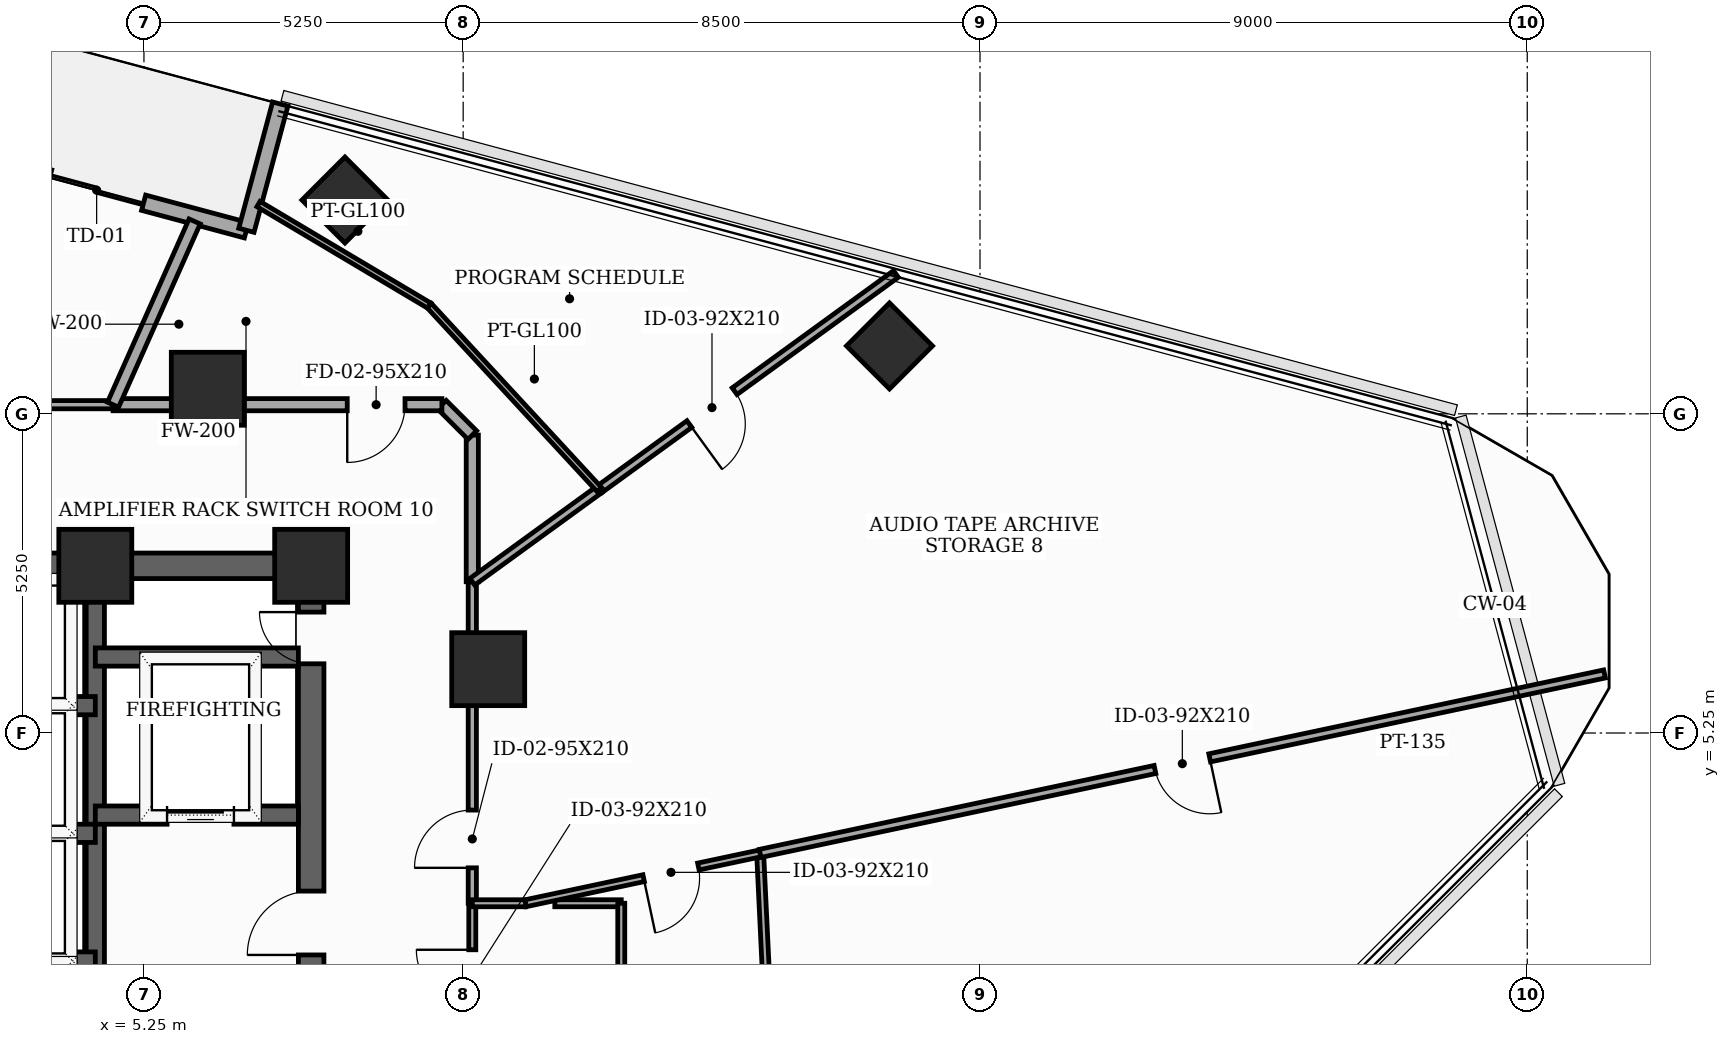
"""IFC4 building model, lengths in metres.
Left out: names, types, materials, properties, quantities, classifications, styles, units other than length and angle.
Written with IfcOpenShell. Run it as: python <this file> out.ifc"""

import sys

from ifc_helpers import new_model, si_unit, direction, frame, frame_2d, origin, origin_2d, place, context, subcontext, project, spatial, rectangle, extrude, element, fill, save


model = new_model("IFC4")
c1 = context("Model", 3, precision=1e-05, world=origin(), true_north=direction((0.0, 1.0)))
c2 = subcontext(c1, "Body", "Model", "MODEL_VIEW")
j1 = project(units=[si_unit("LENGTHUNIT", "METRE"), si_unit("PLANEANGLEUNIT", "RADIAN")], contexts=[c1])
p1 = place(None, origin())
s1 = spatial("IfcSite", under=j1, at=p1, CompositionType="ELEMENT")
p2 = place(p1, origin())
s2 = spatial("IfcBuilding", under=s1, at=p2, CompositionType="ELEMENT")
p3 = place(p2, frame((0.0, 0.0, 191.6)))
s3 = spatial("IfcBuildingStorey", under=s2, at=p3, CompositionType="ELEMENT", Elevation=191.6)
for number, where, z_axis, x_axis in (
    (1, (8.0, 8.0, 0.0), (0.0, 0.0, 1.0), (1.0, 0.0, 0.0)),
    (2, (4.45, 8.0, 0.0), (0.0, 0.0, 1.0), (1.0, 0.0, 0.0)),
    (3, (10.912, 6.3, 0.0), (0.0, 0.0, 1.0), (1.0, 0.0, 0.0)),
    (4, (6.3, 10.912, 0.0), (0.0, 0.0, 1.0), (1.0, 0.0, 0.0)),
):
    element("IfcColumn", number, at=place(p3, frame(where, z_axis=z_axis, x_axis=x_axis)), inside=s3, PredefinedType="COLUMN", context=c2, shape_type="SweptSolid", body=[
        extrude(rectangle(XDim=1.2, YDim=1.2, at=origin_2d()), origin(), (0.0, 0.0, 1.0), 3.7),
    ])
for number, where, z_axis, x_axis in (
    (5, (17.511, 11.616, 0.0), (0.0, 0.0, 1.0), (0.707, 0.707, 0.0)),
    (6, (8.555, 14.016, 0.0), (0.0, 0.0, 1.0), (0.707, 0.707, 0.0)),
):
    element("IfcColumn", number, at=place(p3, frame(where, z_axis=z_axis, x_axis=x_axis)), inside=s3, PredefinedType="COLUMN", context=c2, shape_type="SweptSolid", body=[
        extrude(rectangle(XDim=1.0, YDim=1.0, at=origin_2d()), origin(), (0.0, 0.0, 1.0), 3.7),
    ])
p4 = place(p3, frame((6.935, 13.519, 0.0), z_axis=(0.0, 0.0, 1.0), x_axis=(-0.965922825334, 0.258830244561, 0.0)))
e7 = element("IfcWall", 7, at=p4, inside=s3, PredefinedType="SOLIDWALL", context=c2, shape_type="SweptSolid", body=[
    extrude(rectangle(XDim=10.8, YDim=0.26, at=frame_2d((5.4, 0.0))), origin(), (0.0, 0.0, 1.0), 3.5),
])
p5 = place(p4, frame((1.75, 0.0, 0.0)))
e8 = element("IfcOpeningElement", 8, at=p5, cuts=e7, PredefinedType="OPENING", context=c2, shape_type="SweptSolid", body=[
    extrude(rectangle(XDim=1.6, YDim=2.08, at=frame_2d((0.8, 1.04))), frame((0.0, 0.14, 0.0), z_axis=(0.0, -1.0, 0.0), x_axis=(1.0, 0.0, 0.0)), (0.0, 0.0, 1.0), 0.28),
])
p6 = place(p4, frame((5.65, 0.0, 0.85)))
e9 = element("IfcOpeningElement", 9, at=p6, cuts=e7, PredefinedType="OPENING", context=c2, shape_type="SweptSolid", body=[
    extrude(rectangle(XDim=1.3, YDim=1.25, at=frame_2d((0.65, 0.625))), frame((0.0, 0.14, 0.0), z_axis=(0.0, -1.0, 0.0), x_axis=(1.0, 0.0, 0.0)), (0.0, 0.0, 1.0), 0.28),
])
p7 = place(p3, frame((7.492, 15.595, 0.0), z_axis=(0.0, 0.0, 1.0), x_axis=(-0.258772030677, -0.96593842254, 0.0)))
e10 = element("IfcWall", 10, at=p7, inside=s3, PredefinedType="SOLIDWALL", context=c2, shape_type="SweptSolid", body=[
    extrude(rectangle(XDim=2.15, YDim=0.26, at=frame_2d((1.075, 0.0))), origin(), (0.0, 0.0, 1.0), 3.5),
])
p8 = place(p3, frame((8.0, -8.0, 0.0), z_axis=(0.0, 0.0, 1.0), x_axis=(0.0, 1.0, 0.0)))
e11 = element("IfcWall", 11, at=p8, inside=s3, PredefinedType="SHEAR", context=c2, shape_type="SweptSolid", body=[
    extrude(rectangle(XDim=16.0, YDim=0.42, at=frame_2d((8.0, 0.0))), origin(), (0.0, 0.0, 1.0), 3.5),
])
p9 = place(p8, frame((9.6, 0.0, 0.0)))
e12 = element("IfcOpeningElement", 12, at=p9, cuts=e11, PredefinedType="OPENING", context=c2, shape_type="SweptSolid", body=[
    extrude(rectangle(XDim=1.05, YDim=2.15, at=frame_2d((0.525, 1.075))), frame((0.0, 0.22, 0.0), z_axis=(0.0, -1.0, 0.0), x_axis=(1.0, 0.0, 0.0)), (0.0, 0.0, 1.0), 0.44),
])
p10 = place(p8, frame((14.389, 0.0, 0.0)))
e13 = element("IfcOpeningElement", 13, at=p10, cuts=e11, PredefinedType="OPENING", context=c2, shape_type="SweptSolid", body=[
    extrude(rectangle(XDim=0.85, YDim=2.02, at=frame_2d((0.425, 1.01))), frame((0.0, 0.22, 0.0), z_axis=(0.0, -1.0, 0.0), x_axis=(1.0, 0.0, 0.0)), (0.0, 0.0, 1.0), 0.44),
])
p11 = place(p3, frame((-8.0, 8.0, 0.0), z_axis=(0.0, 0.0, 1.0), x_axis=(1.0, 0.0, 0.0)))
e14 = element("IfcWall", 14, at=p11, inside=s3, PredefinedType="SHEAR", context=c2, shape_type="SweptSolid", body=[
    extrude(rectangle(XDim=16.0, YDim=0.42, at=frame_2d((8.0, 0.0))), origin(), (0.0, 0.0, 1.0), 3.5),
])
p12 = place(p11, frame((7.1, 0.0, 0.0)))
e15 = element("IfcOpeningElement", 15, at=p12, cuts=e14, PredefinedType="OPENING", context=c2, shape_type="SweptSolid", body=[
    extrude(rectangle(XDim=1.8, YDim=2.15, at=frame_2d((0.9, 1.075))), frame((0.0, 0.22, 0.0), z_axis=(0.0, -1.0, 0.0), x_axis=(1.0, 0.0, 0.0)), (0.0, 0.0, 1.0), 0.44),
])
p13 = place(p3, frame((4.45, -7.79, 0.0), z_axis=(0.0, 0.0, 1.0), x_axis=(0.0, 1.0, 0.0)))
e16 = element("IfcWall", 16, at=p13, inside=s3, PredefinedType="SHEAR", context=c2, shape_type="SweptSolid", body=[
    extrude(rectangle(XDim=15.58, YDim=0.3, at=frame_2d((7.79, 0.0))), origin(), (0.0, 0.0, 1.0), 3.5),
])
p14 = place(p3, frame((4.45, 3.9, 0.0), z_axis=(0.0, 0.0, 1.0), x_axis=(1.0, 0.0, 0.0)))
e17 = element("IfcWall", 17, at=p14, inside=s3, PredefinedType="SHEAR", context=c2, shape_type="SweptSolid", body=[
    extrude(rectangle(XDim=3.34, YDim=0.3, at=frame_2d((1.67, 0.0))), origin(), (0.0, 0.0, 1.0), 3.5),
])
p15 = place(p14, frame((1.18, 0.0, 0.0)))
e18 = element("IfcOpeningElement", 18, at=p15, cuts=e17, PredefinedType="OPENING", context=c2, shape_type="SweptSolid", body=[
    extrude(rectangle(XDim=1.1, YDim=2.1, at=frame_2d((0.55, 1.05))), frame((0.0, 0.16, 0.0), z_axis=(0.0, -1.0, 0.0), x_axis=(1.0, 0.0, 0.0)), (0.0, 0.0, 1.0), 0.32),
])
p16 = place(p3, frame((4.45, 6.5, 0.0), z_axis=(0.0, 0.0, 1.0), x_axis=(1.0, 0.0, 0.0)))
e19 = element("IfcWall", 19, at=p16, inside=s3, PredefinedType="SHEAR", context=c2, shape_type="SweptSolid", body=[
    extrude(rectangle(XDim=3.34, YDim=0.3, at=frame_2d((1.67, 0.0))), origin(), (0.0, 0.0, 1.0), 3.5),
])
for number, where, z_axis, x_axis in (
    (20, (1.68, 1.5, 0.0), (0.0, 0.0, 1.0), (1.0, 0.0, 0.0)),
    (21, (1.68, 3.6, 0.0), (0.0, 0.0, 1.0), (1.0, 0.0, 0.0)),
    (22, (1.68, 5.7, 0.0), (0.0, 0.0, 1.0), (1.0, 0.0, 0.0)),
):
    element("IfcWall", number, at=place(p3, frame(where, z_axis=z_axis, x_axis=x_axis)), inside=s3, PredefinedType="SHEAR", context=c2, shape_type="SweptSolid", body=[
        extrude(rectangle(XDim=2.77, YDim=0.3, at=frame_2d((1.385, 0.0))), origin(), (0.0, 0.0, 1.0), 3.5),
    ])
p17 = place(p3, frame((10.65, 0.0, 0.0), z_axis=(0.0, 0.0, 1.0), x_axis=(0.0, 1.0, 0.0)))
e23 = element("IfcWall", 23, at=p17, inside=s3, PredefinedType="PARTITIONING", context=c2, shape_type="SweptSolid", body=[
    extrude(rectangle(XDim=2.45, YDim=0.115, at=frame_2d((1.225, 0.0))), origin(), (0.0, 0.0, 1.0), 2.885),
])
p18 = place(p17, frame((0.765, 0.0, 0.0)))
e24 = element("IfcOpeningElement", 24, at=p18, cuts=e23, PredefinedType="OPENING", context=c2, shape_type="SweptSolid", body=[
    extrude(rectangle(XDim=0.92, YDim=2.1, at=frame_2d((0.46, 1.05))), frame((0.0, 0.067, 0.0), z_axis=(0.0, -1.0, 0.0), x_axis=(1.0, 0.0, 0.0)), (0.0, 0.0, 1.0), 0.135),
])
p19 = place(p3, frame((10.65, 2.45, 0.0), z_axis=(0.0, 0.0, 1.0), x_axis=(0.0, 1.0, 0.0)))
e25 = element("IfcWall", 25, at=p19, inside=s3, PredefinedType="PARTITIONING", context=c2, shape_type="SweptSolid", body=[
    extrude(rectangle(XDim=5.288, YDim=0.135, at=frame_2d((2.644, 0.0))), origin(), (0.0, 0.0, 1.0), 2.885),
])
p20 = place(p19, frame((0.583, 0.0, 0.0)))
e26 = element("IfcOpeningElement", 26, at=p20, cuts=e25, PredefinedType="OPENING", context=c2, shape_type="SweptSolid", body=[
    extrude(rectangle(XDim=0.95, YDim=2.1, at=frame_2d((0.475, 1.05))), frame((0.0, 0.077, 0.0), z_axis=(0.0, -1.0, 0.0), x_axis=(1.0, 0.0, 0.0)), (0.0, 0.0, 1.0), 0.155),
])
p21 = place(p3, frame((10.65, 7.738, 0.0), z_axis=(0.0, 0.0, 1.0), x_axis=(0.0, 1.0, 0.0)))
e27 = element("IfcWall", 27, at=p21, inside=s3, PredefinedType="SOLIDWALL", context=c2, shape_type="SweptSolid", body=[
    extrude(rectangle(XDim=2.412, YDim=0.2, at=frame_2d((1.206, 0.0))), origin(), (0.0, 0.0, 1.0), 3.5),
])
p22 = place(p3, frame((10.65, 10.15, 0.0), z_axis=(0.0, 0.0, 1.0), x_axis=(-0.707106781187, 0.707106781187, 0.0)))
e28 = element("IfcWall", 28, at=p22, inside=s3, PredefinedType="SOLIDWALL", context=c2, shape_type="SweptSolid", body=[
    extrude(rectangle(XDim=0.707, YDim=0.2, at=frame_2d((0.354, 0.0))), origin(), (0.0, 0.0, 1.0), 3.5),
])
p23 = place(p3, frame((10.15, 10.65, 0.0), z_axis=(0.0, 0.0, 1.0), x_axis=(-1.0, 0.0, 0.0)))
e29 = element("IfcWall", 29, at=p23, inside=s3, PredefinedType="SOLIDWALL", context=c2, shape_type="SweptSolid", body=[
    extrude(rectangle(XDim=5.408, YDim=0.2, at=frame_2d((2.704, 0.0))), origin(), (0.0, 0.0, 1.0), 2.885),
])
p24 = place(p23, frame((0.607, 0.0, 0.0)))
e30 = element("IfcOpeningElement", 30, at=p24, cuts=e29, PredefinedType="OPENING", context=c2, shape_type="SweptSolid", body=[
    extrude(rectangle(XDim=0.95, YDim=2.1, at=frame_2d((0.475, 1.05))), frame((0.0, 0.11, 0.0), z_axis=(0.0, -1.0, 0.0), x_axis=(1.0, 0.0, 0.0)), (0.0, 0.0, 1.0), 0.22),
])
p25 = place(p3, frame((4.742, 10.65, 0.0), z_axis=(0.0, 0.0, 1.0), x_axis=(-1.0, 0.0, 0.0)))
e31 = element("IfcWall", 31, at=p25, inside=s3, PredefinedType="PARTITIONING", context=c2, shape_type="SweptSolid", body=[
    extrude(rectangle(XDim=7.006, YDim=0.135, at=frame_2d((3.503, 0.0))), origin(), (0.0, 0.0, 1.0), 2.885),
])
p26 = place(p25, frame((3.028, 0.0, 0.0)))
e32 = element("IfcOpeningElement", 32, at=p26, cuts=e31, PredefinedType="OPENING", context=c2, shape_type="SweptSolid", body=[
    extrude(rectangle(XDim=0.95, YDim=2.1, at=frame_2d((0.475, 1.05))), frame((0.0, 0.077, 0.0), z_axis=(0.0, -1.0, 0.0), x_axis=(1.0, 0.0, 0.0)), (0.0, 0.0, 1.0), 0.155),
])
p27 = place(p3, frame((15.646, -2.199, 0.0), z_axis=(0.0, 0.0, 1.0), x_axis=(-0.047844791808, 0.998854782187, 0.0)))
e33 = element("IfcWall", 33, at=p27, inside=s3, PredefinedType="PARTITIONING", context=c2, shape_type="SweptSolid", body=[
    extrude(rectangle(XDim=5.475, YDim=0.115, at=frame_2d((2.738, 0.0))), origin(), (0.0, 0.0, 1.0), 2.985),
])
p28 = place(p3, frame((12.007, 2.45, 0.0), z_axis=(0.0, 0.0, 1.0), x_axis=(1.0, 0.0, 0.0)))
e34 = element("IfcWall", 34, at=p28, inside=s3, PredefinedType="PARTITIONING", context=c2, shape_type="SweptSolid", body=[
    extrude(rectangle(XDim=1.093, YDim=0.115, at=frame_2d((0.546, 0.0))), origin(), (0.0, 0.0, 1.0), 2.885),
])
p29 = place(p3, frame((13.1, 2.45, 0.0), z_axis=(0.0, 0.0, 1.0), x_axis=(0.0, -1.0, 0.0)))
e35 = element("IfcWall", 35, at=p29, inside=s3, PredefinedType="PARTITIONING", context=c2, shape_type="SweptSolid", body=[
    extrude(rectangle(XDim=2.45, YDim=0.115, at=frame_2d((1.225, 0.0))), origin(), (0.0, 0.0, 1.0), 2.985),
])
p30 = place(p3, frame((15.384, 3.27, 0.0), z_axis=(0.0, 0.0, 1.0), x_axis=(-0.978147995284, -0.207909834598, 0.0)))
e36 = element("IfcWall", 36, at=p30, inside=s3, PredefinedType="PARTITIONING", context=c2, shape_type="SweptSolid", body=[
    extrude(rectangle(XDim=3.944, YDim=0.115, at=frame_2d((1.972, 0.0))), origin(), (0.0, 0.0, 1.0), 2.885),
])
p31 = place(p30, frame((1.039, 0.0, 0.0)))
e37 = element("IfcOpeningElement", 37, at=p31, cuts=e36, PredefinedType="OPENING", context=c2, shape_type="SweptSolid", body=[
    extrude(rectangle(XDim=0.92, YDim=2.1, at=frame_2d((0.46, 1.05))), frame((0.0, 0.067, 0.0), z_axis=(0.0, -1.0, 0.0), x_axis=(1.0, 0.0, 0.0)), (0.0, 0.0, 1.0), 0.135),
])
p32 = place(p3, frame((29.271, 6.221, 0.0), z_axis=(0.0, 0.0, 1.0), x_axis=(-0.978151114267, -0.207895160259, 0.0)))
e38 = element("IfcWall", 38, at=p32, inside=s3, PredefinedType="PARTITIONING", context=c2, shape_type="SweptSolid", body=[
    extrude(rectangle(XDim=14.197, YDim=0.135, at=frame_2d((7.098, 0.0))), origin(), (0.0, 0.0, 1.0), 2.985),
])
p33 = place(p32, frame((6.638, 0.0, 0.0)))
e39 = element("IfcOpeningElement", 39, at=p33, cuts=e38, PredefinedType="OPENING", context=c2, shape_type="SweptSolid", body=[
    extrude(rectangle(XDim=0.92, YDim=2.1, at=frame_2d((0.46, 1.05))), frame((0.0, 0.077, 0.0), z_axis=(0.0, -1.0, 0.0), x_axis=(1.0, 0.0, 0.0)), (0.0, 0.0, 1.0), 0.155),
])
p34 = place(p3, frame((11.526, 2.45, 0.0), z_axis=(0.0, 0.0, 1.0), x_axis=(-1.0, 0.0, 0.0)))
e40 = element("IfcWall", 40, at=p34, inside=s3, PredefinedType="PARTITIONING", context=c2, shape_type="SweptSolid", body=[
    extrude(rectangle(XDim=0.876, YDim=0.115, at=frame_2d((0.438, 0.0))), origin(), (0.0, 0.0, 1.0), 3.5),
])
p35 = place(p3, frame((17.617, 12.8, 0.0), z_axis=(0.0, 0.0, 1.0), x_axis=(-0.809021342768, -0.587779267196, 0.0)))
e41 = element("IfcWall", 41, at=p35, inside=s3, PredefinedType="PARTITIONING", context=c2, shape_type="SweptSolid", body=[
    extrude(rectangle(XDim=6.031, YDim=0.135, at=frame_2d((3.015, 0.0))), origin(), (0.0, 0.0, 1.0), 2.985),
])
p36 = place(p35, frame((3.279, 0.0, 0.0)))
e42 = element("IfcOpeningElement", 42, at=p36, cuts=e41, PredefinedType="OPENING", context=c2, shape_type="SweptSolid", body=[
    extrude(rectangle(XDim=0.92, YDim=2.1, at=frame_2d((0.46, 1.05))), frame((0.0, 0.077, 0.0), z_axis=(0.0, -1.0, 0.0), x_axis=(1.0, 0.0, 0.0)), (0.0, 0.0, 1.0), 0.155),
])
p37 = place(p3, frame((12.738, 9.255, 0.0), z_axis=(0.0, 0.0, 1.0), x_axis=(-0.809067292609, -0.587716016483, 0.0)))
e43 = element("IfcWall", 43, at=p37, inside=s3, PredefinedType="PARTITIONING", context=c2, shape_type="SweptSolid", body=[
    extrude(rectangle(XDim=2.581, YDim=0.135, at=frame_2d((1.291, 0.0))), origin(), (0.0, 0.0, 1.0), 3.5),
])
p38 = place(p3, frame((7.134, 13.95, 0.0), z_axis=(0.0, 0.0, 1.0), x_axis=(0.859456962413, -0.511208108074, 0.0)))
e44 = element("IfcWall", 44, at=p38, inside=s3, PredefinedType="MOVABLE", context=c2, shape_type="SweptSolid", body=[
    extrude(rectangle(XDim=3.269, YDim=0.1, at=frame_2d((1.635, 0.0))), origin(), (0.0, 0.0, 1.0), 2.985),
])
p39 = place(p3, frame((9.943, 12.279, 0.0), z_axis=(0.0, 0.0, 1.0), x_axis=(0.678723214903, -0.734394170423, 0.0)))
e45 = element("IfcWall", 45, at=p39, inside=s3, PredefinedType="MOVABLE", context=c2, shape_type="SweptSolid", body=[
    extrude(rectangle(XDim=4.118, YDim=0.1, at=frame_2d((2.059, 0.0))), origin(), (0.0, 0.0, 1.0), 3.5),
])
p40 = place(p3, frame((6.083, 13.664, 0.0), z_axis=(0.0, 0.0, 1.0), x_axis=(-0.406625887871, -0.913594760993, 0.0)))
e46 = element("IfcWall", 46, at=p40, inside=s3, PredefinedType="SOLIDWALL", context=c2, shape_type="SweptSolid", body=[
    extrude(rectangle(XDim=3.299, YDim=0.2, at=frame_2d((1.65, 0.0))), origin(), (0.0, 0.0, 1.0), 2.885),
])
p41 = place(p5, frame((1.6, 0.0, 0.0), z_axis=(0.0, 0.0, 1.0), x_axis=(-1.0, 0.0, 0.0)))
e47 = element("IfcDoor", 47, at=p41, inside=s3, OperationType="DOUBLE_DOOR_SLIDING", PredefinedType="DOOR", context=c2, shape_type="SweptSolid", body=[
    extrude(rectangle(XDim=1.6, YDim=2.08, at=frame_2d((0.8, 1.04))), frame((0.0, 0.025, 0.0), z_axis=(0.0, -1.0, 0.0), x_axis=(1.0, 0.0, 0.0)), (0.0, 0.0, 1.0), 0.05),
])
fill(e8, e47)
p42 = place(p9, origin())
e48 = element("IfcDoor", 48, at=p42, inside=s3, OperationType="SINGLE_SWING_LEFT", PredefinedType="DOOR", context=c2, shape_type="SweptSolid", body=[
    extrude(rectangle(XDim=1.05, YDim=2.15, at=frame_2d((0.525, 1.075))), frame((0.0, 0.025, 0.0), z_axis=(0.0, -1.0, 0.0), x_axis=(1.0, 0.0, 0.0)), (0.0, 0.0, 1.0), 0.05),
])
fill(e12, e48)
p43 = place(p10, origin())
e49 = element("IfcDoor", 49, at=p43, inside=s3, OperationType="SINGLE_SWING_RIGHT", PredefinedType="TRAPDOOR", context=c2, shape_type="SweptSolid", body=[
    extrude(rectangle(XDim=0.85, YDim=2.02, at=frame_2d((0.425, 1.01))), frame((0.0, 0.025, 0.0), z_axis=(0.0, -1.0, 0.0), x_axis=(1.0, 0.0, 0.0)), (0.0, 0.0, 1.0), 0.05),
])
fill(e13, e49)
p44 = place(p15, origin())
e50 = element("IfcDoor", 50, at=p44, inside=s3, OperationType="SLIDING_TO_LEFT", PredefinedType="DOOR", context=c2, shape_type="SweptSolid", body=[
    extrude(rectangle(XDim=1.1, YDim=2.1, at=frame_2d((0.55, 1.05))), frame((0.0, 0.025, 0.0), z_axis=(0.0, -1.0, 0.0), x_axis=(1.0, 0.0, 0.0)), (0.0, 0.0, 1.0), 0.05),
])
fill(e18, e50)
p45 = place(p18, origin())
e51 = element("IfcDoor", 51, at=p45, inside=s3, OperationType="SINGLE_SWING_RIGHT", PredefinedType="DOOR", context=c2, shape_type="SweptSolid", body=[
    extrude(rectangle(XDim=0.92, YDim=2.1, at=frame_2d((0.46, 1.05))), frame((0.0, 0.025, 0.0), z_axis=(0.0, -1.0, 0.0), x_axis=(1.0, 0.0, 0.0)), (0.0, 0.0, 1.0), 0.05),
])
fill(e24, e51)
p46 = place(p20, origin())
e52 = element("IfcDoor", 52, at=p46, inside=s3, OperationType="SINGLE_SWING_LEFT", PredefinedType="DOOR", context=c2, shape_type="SweptSolid", body=[
    extrude(rectangle(XDim=0.95, YDim=2.1, at=frame_2d((0.475, 1.05))), frame((0.0, 0.025, 0.0), z_axis=(0.0, -1.0, 0.0), x_axis=(1.0, 0.0, 0.0)), (0.0, 0.0, 1.0), 0.05),
])
fill(e26, e52)
p47 = place(p24, origin())
e53 = element("IfcDoor", 53, at=p47, inside=s3, OperationType="SINGLE_SWING_RIGHT", PredefinedType="DOOR", context=c2, shape_type="SweptSolid", body=[
    extrude(rectangle(XDim=0.95, YDim=2.1, at=frame_2d((0.475, 1.05))), frame((0.0, 0.025, 0.0), z_axis=(0.0, -1.0, 0.0), x_axis=(1.0, 0.0, 0.0)), (0.0, 0.0, 1.0), 0.05),
])
fill(e30, e53)
p48 = place(p31, origin())
e54 = element("IfcDoor", 54, at=p48, inside=s3, OperationType="SINGLE_SWING_RIGHT", PredefinedType="DOOR", context=c2, shape_type="SweptSolid", body=[
    extrude(rectangle(XDim=0.92, YDim=2.1, at=frame_2d((0.46, 1.05))), frame((0.0, 0.025, 0.0), z_axis=(0.0, -1.0, 0.0), x_axis=(1.0, 0.0, 0.0)), (0.0, 0.0, 1.0), 0.05),
])
fill(e37, e54)
p49 = place(p33, origin())
e55 = element("IfcDoor", 55, at=p49, inside=s3, OperationType="SINGLE_SWING_LEFT", PredefinedType="DOOR", context=c2, shape_type="SweptSolid", body=[
    extrude(rectangle(XDim=0.92, YDim=2.1, at=frame_2d((0.46, 1.05))), frame((0.0, 0.025, 0.0), z_axis=(0.0, -1.0, 0.0), x_axis=(1.0, 0.0, 0.0)), (0.0, 0.0, 1.0), 0.05),
])
fill(e39, e55)
p50 = place(p36, origin())
e56 = element("IfcDoor", 56, at=p50, inside=s3, OperationType="SINGLE_SWING_RIGHT", PredefinedType="DOOR", context=c2, shape_type="SweptSolid", body=[
    extrude(rectangle(XDim=0.92, YDim=2.1, at=frame_2d((0.46, 1.05))), frame((0.0, 0.025, 0.0), z_axis=(0.0, -1.0, 0.0), x_axis=(1.0, 0.0, 0.0)), (0.0, 0.0, 1.0), 0.05),
])
fill(e42, e56)
save(model, sys.argv[1])
